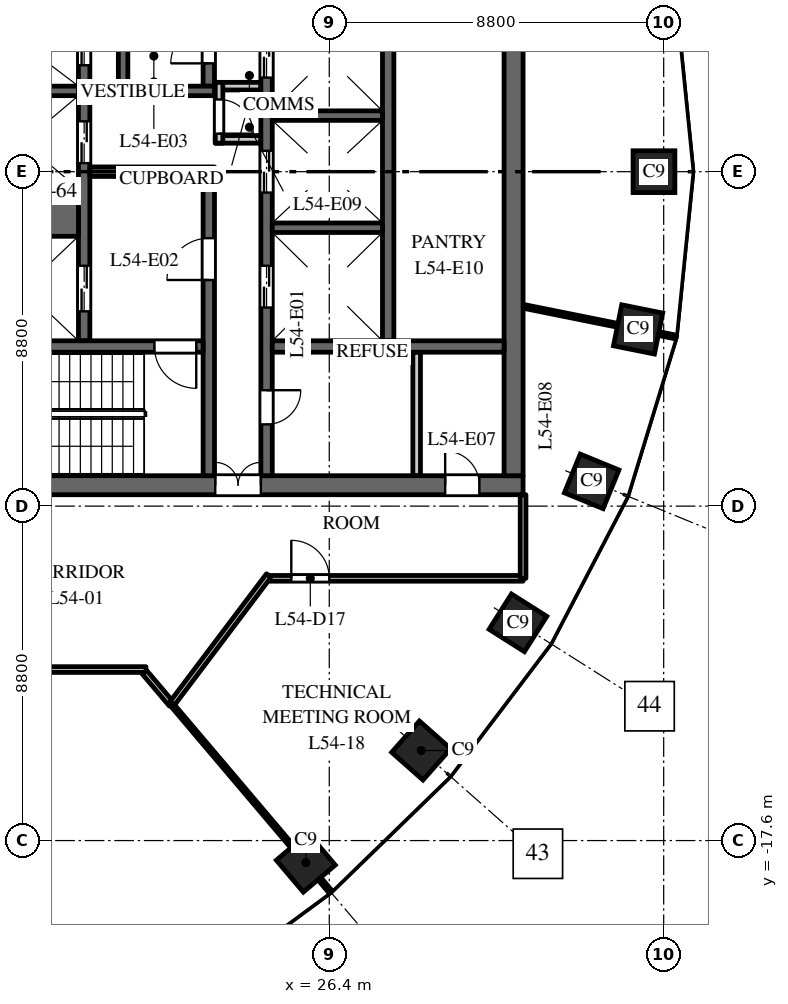
"""IFC4 building model, lengths in metres.
Left out: names, types, materials, properties, quantities, classifications, styles, units other than length and angle.
Written with IfcOpenShell. Run it as: python <this file> out.ifc"""

import sys

from ifc_helpers import new_model, si_unit, direction, frame, frame_2d, origin, origin_2d, place, context, subcontext, project, spatial, rectangle, extrude, element, fill, save


model = new_model("IFC4")
c1 = context("Model", 3, precision=1e-05, world=origin(), true_north=direction((0.0, 1.0)))
c2 = subcontext(c1, "Body", "Model", "MODEL_VIEW")
j1 = project(units=[si_unit("LENGTHUNIT", "METRE"), si_unit("PLANEANGLEUNIT", "RADIAN")], contexts=[c1])
p1 = place(None, origin())
s1 = spatial("IfcSite", under=j1, at=p1, CompositionType="ELEMENT")
p2 = place(p1, origin())
s2 = spatial("IfcBuilding", under=s1, at=p2, CompositionType="ELEMENT")
p3 = place(p2, frame((0.0, 0.0, 257.5)))
s3 = spatial("IfcBuildingStorey", under=s2, at=p3, CompositionType="ELEMENT", Elevation=257.5)
for number, where, z_axis, x_axis in (
    (1, (34.945, 0.0, 0.0), (0.0, 0.0, 1.0), (0.0, 1.0, 0.0)),
    (2, (25.783, -18.18, 0.0), (0.0, 0.0, 1.0), (0.763, 0.646, 0.0)),
    (3, (28.819, -15.23, 0.0), (0.0, 0.0, 1.0), (0.663, 0.749, 0.0)),
    (4, (31.365, -11.871, 0.0), (0.0, 0.0, 1.0), (0.535, 0.845, 0.0)),
    (5, (33.305, -8.149, 0.0), (0.0, 0.0, 1.0), (0.379, 0.925, 0.0)),
    (6, (34.527, -4.151, 0.0), (0.0, 0.0, 1.0), (0.197, 0.98, 0.0)),
):
    element("IfcColumn", number, at=place(p3, frame(where, z_axis=z_axis, x_axis=x_axis)), inside=s3, PredefinedType="COLUMN", context=c2, shape_type="SweptSolid", body=[
        extrude(rectangle(XDim=1.1, YDim=1.1, at=origin_2d()), origin(), (0.0, 0.0, 1.0), 4.0),
    ])
p4 = place(p3, frame((16.5, -8.25, 0.0), z_axis=(0.0, 0.0, 1.0), x_axis=(1.0, 0.0, 0.0)))
e7 = element("IfcWall", 7, at=p4, inside=s3, PredefinedType="SHEAR", context=c2, shape_type="SweptSolid", body=[
    extrude(rectangle(XDim=15.0, YDim=0.5, at=frame_2d((7.5, 0.0))), origin(), (0.0, 0.0, 1.0), 3.7),
])
p5 = place(p4, frame((6.9, 0.0, 0.0)))
e8 = element("IfcOpeningElement", 8, at=p5, cuts=e7, PredefinedType="OPENING", context=c2, shape_type="SweptSolid", body=[
    extrude(rectangle(XDim=1.2, YDim=2.1, at=frame_2d((0.6, 1.05))), frame((0.0, 0.26, 0.0), z_axis=(0.0, -1.0, 0.0), x_axis=(1.0, 0.0, 0.0)), (0.0, 0.0, 1.0), 0.52),
])
p6 = place(p4, frame((12.95, 0.0, 0.0)))
e9 = element("IfcOpeningElement", 9, at=p6, cuts=e7, PredefinedType="OPENING", context=c2, shape_type="SweptSolid", body=[
    extrude(rectangle(XDim=0.9, YDim=2.1, at=frame_2d((0.45, 1.05))), frame((0.0, 0.26, 0.0), z_axis=(0.0, -1.0, 0.0), x_axis=(1.0, 0.0, 0.0)), (0.0, 0.0, 1.0), 0.52),
])
p7 = place(p3, frame((27.95, -4.45, 0.0), z_axis=(0.0, 0.0, 1.0), x_axis=(0.0, 1.0, 0.0)))
e10 = element("IfcWall", 10, at=p7, inside=s3, PredefinedType="SHEAR", context=c2, shape_type="SweptSolid", body=[
    extrude(rectangle(XDim=8.9, YDim=0.3, at=frame_2d((4.45, 0.0))), origin(), (0.0, 0.0, 1.0), 3.7),
])
p8 = place(p3, frame((19.95, -4.45, 0.0), z_axis=(0.0, 0.0, 1.0), x_axis=(0.0, 1.0, 0.0)))
e11 = element("IfcWall", 11, at=p8, inside=s3, PredefinedType="SHEAR", context=c2, shape_type="SweptSolid", body=[
    extrude(rectangle(XDim=8.9, YDim=0.3, at=frame_2d((4.45, 0.0))), origin(), (0.0, 0.0, 1.0), 3.7),
])
p9 = place(p8, frame((0.775, 0.0, 0.0)))
e12 = element("IfcOpeningElement", 12, at=p9, cuts=e11, PredefinedType="OPENING", context=c2, shape_type="SweptSolid", body=[
    extrude(rectangle(XDim=1.2, YDim=2.1, at=frame_2d((0.6, 1.05))), frame((0.0, 0.16, 0.0), z_axis=(0.0, -1.0, 0.0), x_axis=(1.0, 0.0, 0.0)), (0.0, 0.0, 1.0), 0.32),
])
p10 = place(p8, frame((4.675, 0.0, 0.0)))
e13 = element("IfcOpeningElement", 13, at=p10, cuts=e11, PredefinedType="OPENING", context=c2, shape_type="SweptSolid", body=[
    extrude(rectangle(XDim=1.1, YDim=2.1, at=frame_2d((0.55, 1.05))), frame((0.0, 0.16, 0.0), z_axis=(0.0, -1.0, 0.0), x_axis=(1.0, 0.0, 0.0)), (0.0, 0.0, 1.0), 0.32),
])
p11 = place(p8, frame((7.25, 0.0, 0.0)))
e14 = element("IfcOpeningElement", 14, at=p11, cuts=e11, PredefinedType="OPENING", context=c2, shape_type="SweptSolid", body=[
    extrude(rectangle(XDim=1.1, YDim=2.1, at=frame_2d((0.55, 1.05))), frame((0.0, 0.16, 0.0), z_axis=(0.0, -1.0, 0.0), x_axis=(1.0, 0.0, 0.0)), (0.0, 0.0, 1.0), 0.32),
])
p12 = place(p3, frame((24.75, -8.0, 0.0), z_axis=(0.0, 0.0, 1.0), x_axis=(0.0, 1.0, 0.0)))
e15 = element("IfcWall", 15, at=p12, inside=s3, PredefinedType="SHEAR", context=c2, shape_type="SweptSolid", body=[
    extrude(rectangle(XDim=16.0, YDim=0.3, at=frame_2d((8.0, 0.0))), origin(), (0.0, 0.0, 1.0), 3.7),
])
p13 = place(p12, frame((4.425, 0.0, 0.0)))
e16 = element("IfcOpeningElement", 16, at=p13, cuts=e15, PredefinedType="OPENING", context=c2, shape_type="SweptSolid", body=[
    extrude(rectangle(XDim=1.1, YDim=2.1, at=frame_2d((0.55, 1.05))), frame((0.0, 0.16, 0.0), z_axis=(0.0, -1.0, 0.0), x_axis=(1.0, 0.0, 0.0)), (0.0, 0.0, 1.0), 0.32),
])
p14 = place(p12, frame((7.45, 0.0, 0.0)))
e17 = element("IfcOpeningElement", 17, at=p14, cuts=e15, PredefinedType="OPENING", context=c2, shape_type="SweptSolid", body=[
    extrude(rectangle(XDim=1.1, YDim=2.1, at=frame_2d((0.55, 1.05))), frame((0.0, 0.16, 0.0), z_axis=(0.0, -1.0, 0.0), x_axis=(1.0, 0.0, 0.0)), (0.0, 0.0, 1.0), 0.32),
])
p15 = place(p12, frame((10.475, 0.0, 0.0)))
e18 = element("IfcOpeningElement", 18, at=p15, cuts=e15, PredefinedType="OPENING", context=c2, shape_type="SweptSolid", body=[
    extrude(rectangle(XDim=1.1, YDim=2.1, at=frame_2d((0.55, 1.05))), frame((0.0, 0.16, 0.0), z_axis=(0.0, -1.0, 0.0), x_axis=(1.0, 0.0, 0.0)), (0.0, 0.0, 1.0), 0.32),
])
p16 = place(p12, frame((13.125, 0.0, 0.0)))
e19 = element("IfcOpeningElement", 19, at=p16, cuts=e15, PredefinedType="OPENING", context=c2, shape_type="SweptSolid", body=[
    extrude(rectangle(XDim=0.9, YDim=2.1, at=frame_2d((0.45, 1.05))), frame((0.0, 0.16, 0.0), z_axis=(0.0, -1.0, 0.0), x_axis=(1.0, 0.0, 0.0)), (0.0, 0.0, 1.0), 0.32),
])
p17 = place(p12, frame((14.75, 0.0, 0.0)))
e20 = element("IfcOpeningElement", 20, at=p17, cuts=e15, PredefinedType="OPENING", context=c2, shape_type="SweptSolid", body=[
    extrude(rectangle(XDim=0.9, YDim=2.1, at=frame_2d((0.45, 1.05))), frame((0.0, 0.16, 0.0), z_axis=(0.0, -1.0, 0.0), x_axis=(1.0, 0.0, 0.0)), (0.0, 0.0, 1.0), 0.32),
])
p18 = place(p12, frame((1.35, 0.0, 0.0)))
e21 = element("IfcOpeningElement", 21, at=p18, cuts=e15, PredefinedType="OPENING", context=c2, shape_type="SweptSolid", body=[
    extrude(rectangle(XDim=0.9, YDim=2.1, at=frame_2d((0.45, 1.05))), frame((0.0, 0.16, 0.0), z_axis=(0.0, -1.0, 0.0), x_axis=(1.0, 0.0, 0.0)), (0.0, 0.0, 1.0), 0.32),
])
p19 = place(p3, frame((20.1, 0.0, 0.0), z_axis=(0.0, 0.0, 1.0), x_axis=(1.0, 0.0, 0.0)))
e22 = element("IfcWall", 22, at=p19, inside=s3, PredefinedType="SHEAR", context=c2, shape_type="SweptSolid", body=[
    extrude(rectangle(XDim=3.28, YDim=0.25, at=frame_2d((1.64, 0.0))), origin(), (0.0, 0.0, 1.0), 3.7),
])
for number, where, z_axis, x_axis in (
    (23, (23.4, 0.85, 0.0), (0.0, 0.0, 1.0), (1.0, 0.0, 0.0)),
    (24, (23.4, 2.25, 0.0), (0.0, 0.0, 1.0), (1.0, 0.0, 0.0)),
):
    element("IfcWall", number, at=place(p3, frame(where, z_axis=z_axis, x_axis=x_axis)), inside=s3, PredefinedType="PARTITIONING", context=c2, shape_type="SweptSolid", body=[
        extrude(rectangle(XDim=1.2, YDim=0.2, at=frame_2d((0.6, 0.0))), origin(), (0.0, 0.0, 1.0), 3.7),
    ])
p20 = place(p3, frame((23.5, 0.75, 0.0), z_axis=(0.0, 0.0, 1.0), x_axis=(0.0, 1.0, 0.0)))
e25 = element("IfcWall", 25, at=p20, inside=s3, PredefinedType="PARTITIONING", context=c2, shape_type="SweptSolid", body=[
    extrude(rectangle(XDim=1.6, YDim=0.2, at=frame_2d((0.8, 0.0))), origin(), (0.0, 0.0, 1.0), 3.7),
])
p21 = place(p20, frame((0.25, 0.0, 0.0)))
e26 = element("IfcOpeningElement", 26, at=p21, cuts=e25, PredefinedType="OPENING", context=c2, shape_type="SweptSolid", body=[
    extrude(rectangle(XDim=0.9, YDim=2.1, at=frame_2d((0.45, 1.05))), frame((0.0, 0.11, 0.0), z_axis=(0.0, -1.0, 0.0), x_axis=(1.0, 0.0, 0.0)), (0.0, 0.0, 1.0), 0.22),
])
p22 = place(p3, frame((31.25, -8.0, 0.0), z_axis=(0.0, 0.0, 1.0), x_axis=(0.0, 1.0, 0.0)))
e27 = element("IfcWall", 27, at=p22, inside=s3, PredefinedType="SHEAR", context=c2, shape_type="SweptSolid", body=[
    extrude(rectangle(XDim=16.0, YDim=0.5, at=frame_2d((8.0, 0.0))), origin(), (0.0, 0.0, 1.0), 3.7),
])
p23 = place(p3, frame((28.7, -8.0, 0.0), z_axis=(0.0, 0.0, 1.0), x_axis=(0.0, 1.0, 0.0)))
e28 = element("IfcWall", 28, at=p23, inside=s3, PredefinedType="PARTITIONING", context=c2, shape_type="SweptSolid", body=[
    extrude(rectangle(XDim=3.25, YDim=0.2, at=frame_2d((1.625, 0.0))), origin(), (0.0, 0.0, 1.0), 3.7),
])
p24 = place(p3, frame((24.9, -4.6, 0.0), z_axis=(0.0, 0.0, 1.0), x_axis=(1.0, 0.0, 0.0)))
e29 = element("IfcWall", 29, at=p24, inside=s3, PredefinedType="SHEAR", context=c2, shape_type="SweptSolid", body=[
    extrude(rectangle(XDim=6.1, YDim=0.3, at=frame_2d((3.05, 0.0))), origin(), (0.0, 0.0, 1.0), 3.7),
])
p25 = place(p3, frame((16.9, -1.075, 0.0), z_axis=(0.0, 0.0, 1.0), x_axis=(1.0, 0.0, 0.0)))
e30 = element("IfcWall", 30, at=p25, inside=s3, PredefinedType="SHEAR", context=c2, shape_type="SweptSolid", body=[
    extrude(rectangle(XDim=2.9, YDim=1.25, at=frame_2d((1.45, 0.0))), origin(), (0.0, 0.0, 1.0), 3.7),
])
for number, where, z_axis, x_axis in (
    (31, (16.9, 2.125, 0.0), (0.0, 0.0, 1.0), (1.0, 0.0, 0.0)),
    (32, (24.9, -1.475, 0.0), (0.0, 0.0, 1.0), (1.0, 0.0, 0.0)),
    (33, (24.9, 1.475, 0.0), (0.0, 0.0, 1.0), (1.0, 0.0, 0.0)),
):
    element("IfcWall", number, at=place(p3, frame(where, z_axis=z_axis, x_axis=x_axis)), inside=s3, PredefinedType="SHEAR", context=c2, shape_type="SweptSolid", body=[
        extrude(rectangle(XDim=2.9, YDim=0.25, at=frame_2d((1.45, 0.0))), origin(), (0.0, 0.0, 1.0), 3.7),
    ])
p26 = place(p3, frame((23.23, 2.25, 0.0), z_axis=(0.0, 0.0, 1.0), x_axis=(0.0, 1.0, 0.0)))
e34 = element("IfcWall", 34, at=p26, inside=s3, PredefinedType="SHEAR", context=c2, shape_type="SweptSolid", body=[
    extrude(rectangle(XDim=5.75, YDim=0.3, at=frame_2d((2.875, 0.0))), origin(), (0.0, 0.0, 1.0), 3.7),
])
p27 = place(p26, frame((0.6, 0.0, 0.0)))
e35 = element("IfcOpeningElement", 35, at=p27, cuts=e34, PredefinedType="OPENING", context=c2, shape_type="SweptSolid", body=[
    extrude(rectangle(XDim=1.0, YDim=2.1, at=frame_2d((0.5, 1.05))), frame((0.0, 0.16, 0.0), z_axis=(0.0, -1.0, 0.0), x_axis=(1.0, 0.0, 0.0)), (0.0, 0.0, 1.0), 0.32),
])
p28 = place(p3, frame((23.23, -8.0, 0.0), z_axis=(0.0, 0.0, 1.0), x_axis=(0.0, 1.0, 0.0)))
e36 = element("IfcWall", 36, at=p28, inside=s3, PredefinedType="SHEAR", context=c2, shape_type="SweptSolid", body=[
    extrude(rectangle(XDim=7.875, YDim=0.3, at=frame_2d((3.938, 0.0))), origin(), (0.0, 0.0, 1.0), 3.7),
])
p29 = place(p28, frame((5.15, 0.0, 0.0)))
e37 = element("IfcOpeningElement", 37, at=p29, cuts=e36, PredefinedType="OPENING", context=c2, shape_type="SweptSolid", body=[
    extrude(rectangle(XDim=1.1, YDim=2.1, at=frame_2d((0.55, 1.05))), frame((0.0, 0.16, 0.0), z_axis=(0.0, -1.0, 0.0), x_axis=(1.0, 0.0, 0.0)), (0.0, 0.0, 1.0), 0.32),
])
p30 = place(p3, frame((16.9, -4.6, 0.0), z_axis=(0.0, 0.0, 1.0), x_axis=(1.0, 0.0, 0.0)))
e38 = element("IfcWall", 38, at=p30, inside=s3, PredefinedType="SHEAR", context=c2, shape_type="SweptSolid", body=[
    extrude(rectangle(XDim=6.18, YDim=0.3, at=frame_2d((3.09, 0.0))), origin(), (0.0, 0.0, 1.0), 3.7),
])
p31 = place(p30, frame((4.9, 0.0, 0.0)))
e39 = element("IfcOpeningElement", 39, at=p31, cuts=e38, PredefinedType="OPENING", context=c2, shape_type="SweptSolid", body=[
    extrude(rectangle(XDim=1.1, YDim=2.1, at=frame_2d((0.55, 1.05))), frame((0.0, 0.16, 0.0), z_axis=(0.0, -1.0, 0.0), x_axis=(1.0, 0.0, 0.0)), (0.0, 0.0, 1.0), 0.32),
])
p32 = place(p3, frame((20.85, 2.125, 0.0), z_axis=(0.0, 0.0, 1.0), x_axis=(1.0, 0.0, 0.0)))
e40 = element("IfcWall", 40, at=p32, inside=s3, PredefinedType="SHEAR", context=c2, shape_type="SweptSolid", body=[
    extrude(rectangle(XDim=2.53, YDim=0.25, at=frame_2d((1.265, 0.0))), origin(), (0.0, 0.0, 1.0), 3.7),
])
p33 = place(p3, frame((20.975, 2.25, 0.0), z_axis=(0.0, 0.0, 1.0), x_axis=(0.0, 1.0, 0.0)))
e41 = element("IfcWall", 41, at=p33, inside=s3, PredefinedType="SHEAR", context=c2, shape_type="SweptSolid", body=[
    extrude(rectangle(XDim=2.2, YDim=0.25, at=frame_2d((1.1, 0.0))), origin(), (0.0, 0.0, 1.0), 3.7),
])
p34 = place(p3, frame((7.524, -13.1, 0.0), z_axis=(0.0, 0.0, 1.0), x_axis=(1.0, 0.0, 0.0)))
e42 = element("IfcWall", 42, at=p34, inside=s3, PredefinedType="PARTITIONING", context=c2, shape_type="SweptSolid", body=[
    extrude(rectangle(XDim=14.052, YDim=0.15, at=frame_2d((7.026, 0.0))), origin(), (0.0, 0.0, 1.0), 2.85),
])
p35 = place(p34, frame((0.633, 0.0, 0.0)))
e43 = element("IfcOpeningElement", 43, at=p35, cuts=e42, PredefinedType="OPENING", context=c2, shape_type="SweptSolid", body=[
    extrude(rectangle(XDim=1.0, YDim=2.1, at=frame_2d((0.5, 1.05))), frame((0.0, 0.085, 0.0), z_axis=(0.0, -1.0, 0.0), x_axis=(1.0, 0.0, 0.0)), (0.0, 0.0, 1.0), 0.17),
])
p36 = place(p3, frame((21.541, -13.175, 0.0), z_axis=(0.0, 0.0, 1.0), x_axis=(0.646460291141, -0.762947633837, 0.0)))
e44 = element("IfcWall", 44, at=p36, inside=s3, PredefinedType="PARTITIONING", context=c2, shape_type="SweptSolid", body=[
    extrude(rectangle(XDim=1.098, YDim=0.15, at=frame_2d((0.549, 0.0))), origin(), (0.0, 0.0, 1.0), 3.7),
])
p37 = place(p3, frame((22.251, -14.013, 0.0), z_axis=(0.0, 0.0, 1.0), x_axis=(0.602435944628, 0.798167233492, 0.0)))
e45 = element("IfcWall", 45, at=p37, inside=s3, PredefinedType="PARTITIONING", context=c2, shape_type="SweptSolid", body=[
    extrude(rectangle(XDim=4.245, YDim=0.15, at=frame_2d((2.122, 0.0))), origin(), (0.0, 0.0, 1.0), 2.75),
])
p38 = place(p3, frame((22.251, -14.013, 0.0), z_axis=(0.0, 0.0, 1.0), x_axis=(0.646448300096, -0.76295779392, 0.0)))
e46 = element("IfcWall", 46, at=p38, inside=s3, PredefinedType="PARTITIONING", context=c2, shape_type="SweptSolid", body=[
    extrude(rectangle(XDim=6.465, YDim=0.1, at=frame_2d((3.232, 0.0))), origin(), (0.0, 0.0, 1.0), 3.0),
])
p39 = place(p3, frame((24.845, -10.7, 0.0), z_axis=(0.0, 0.0, 1.0), x_axis=(1.0, 0.0, 0.0)))
e47 = element("IfcWall", 47, at=p39, inside=s3, PredefinedType="PARTITIONING", context=c2, shape_type="SweptSolid", body=[
    extrude(rectangle(XDim=6.655, YDim=0.15, at=frame_2d((3.328, 0.0))), origin(), (0.0, 0.0, 1.0), 3.0),
])
p40 = place(p39, frame((0.556, 0.0, 0.0)))
e48 = element("IfcOpeningElement", 48, at=p40, cuts=e47, PredefinedType="OPENING", context=c2, shape_type="SweptSolid", body=[
    extrude(rectangle(XDim=1.0, YDim=2.1, at=frame_2d((0.5, 1.05))), frame((0.0, 0.085, 0.0), z_axis=(0.0, -1.0, 0.0), x_axis=(1.0, 0.0, 0.0)), (0.0, 0.0, 1.0), 0.17),
])
p41 = place(p3, frame((31.5, -10.7, 0.0), z_axis=(0.0, 0.0, 1.0), x_axis=(0.0, 1.0, 0.0)))
e49 = element("IfcWall", 49, at=p41, inside=s3, PredefinedType="PARTITIONING", context=c2, shape_type="SweptSolid", body=[
    extrude(rectangle(XDim=2.2, YDim=0.15, at=frame_2d((1.1, 0.0))), origin(), (0.0, 0.0, 1.0), 3.0),
])
p42 = place(p3, frame((31.5, -3.542, 0.0), z_axis=(0.0, 0.0, 1.0), x_axis=(0.980357474535, -0.197228857227, 0.0)))
e50 = element("IfcWall", 50, at=p42, inside=s3, PredefinedType="PARTITIONING", context=c2, shape_type="SweptSolid", body=[
    extrude(rectangle(XDim=4.092, YDim=0.1, at=frame_2d((2.046, 0.0))), origin(), (0.0, 0.0, 1.0), 3.0),
])
p43 = place(p9, origin())
e51 = element("IfcDoor", 51, at=p43, inside=s3, OperationType="DOUBLE_DOOR_SLIDING", PredefinedType="DOOR", context=c2, shape_type="SweptSolid", body=[
    extrude(rectangle(XDim=1.2, YDim=2.1, at=frame_2d((0.6, 1.05))), frame((0.0, 0.025, 0.0), z_axis=(0.0, -1.0, 0.0), x_axis=(1.0, 0.0, 0.0)), (0.0, 0.0, 1.0), 0.05),
])
fill(e12, e51)
p44 = place(p10, origin())
e52 = element("IfcDoor", 52, at=p44, inside=s3, OperationType="DOUBLE_DOOR_SLIDING", PredefinedType="DOOR", context=c2, shape_type="SweptSolid", body=[
    extrude(rectangle(XDim=1.1, YDim=2.1, at=frame_2d((0.55, 1.05))), frame((0.0, 0.025, 0.0), z_axis=(0.0, -1.0, 0.0), x_axis=(1.0, 0.0, 0.0)), (0.0, 0.0, 1.0), 0.05),
])
fill(e13, e52)
p45 = place(p11, origin())
e53 = element("IfcDoor", 53, at=p45, inside=s3, OperationType="DOUBLE_DOOR_SLIDING", PredefinedType="DOOR", context=c2, shape_type="SweptSolid", body=[
    extrude(rectangle(XDim=1.1, YDim=2.1, at=frame_2d((0.55, 1.05))), frame((0.0, 0.025, 0.0), z_axis=(0.0, -1.0, 0.0), x_axis=(1.0, 0.0, 0.0)), (0.0, 0.0, 1.0), 0.05),
])
fill(e14, e53)
p46 = place(p13, origin())
e54 = element("IfcDoor", 54, at=p46, inside=s3, OperationType="DOUBLE_DOOR_SLIDING", PredefinedType="DOOR", context=c2, shape_type="SweptSolid", body=[
    extrude(rectangle(XDim=1.1, YDim=2.1, at=frame_2d((0.55, 1.05))), frame((0.0, 0.025, 0.0), z_axis=(0.0, -1.0, 0.0), x_axis=(1.0, 0.0, 0.0)), (0.0, 0.0, 1.0), 0.05),
])
fill(e16, e54)
p47 = place(p14, origin())
e55 = element("IfcDoor", 55, at=p47, inside=s3, OperationType="DOUBLE_DOOR_SLIDING", PredefinedType="DOOR", context=c2, shape_type="SweptSolid", body=[
    extrude(rectangle(XDim=1.1, YDim=2.1, at=frame_2d((0.55, 1.05))), frame((0.0, 0.025, 0.0), z_axis=(0.0, -1.0, 0.0), x_axis=(1.0, 0.0, 0.0)), (0.0, 0.0, 1.0), 0.05),
])
fill(e17, e55)
p48 = place(p15, origin())
e56 = element("IfcDoor", 56, at=p48, inside=s3, OperationType="DOUBLE_DOOR_SLIDING", PredefinedType="DOOR", context=c2, shape_type="SweptSolid", body=[
    extrude(rectangle(XDim=1.1, YDim=2.1, at=frame_2d((0.55, 1.05))), frame((0.0, 0.025, 0.0), z_axis=(0.0, -1.0, 0.0), x_axis=(1.0, 0.0, 0.0)), (0.0, 0.0, 1.0), 0.05),
])
fill(e18, e56)
p49 = place(p31, origin())
e57 = element("IfcDoor", 57, at=p49, inside=s3, OperationType="SINGLE_SWING_RIGHT", PredefinedType="DOOR", context=c2, shape_type="SweptSolid", body=[
    extrude(rectangle(XDim=1.1, YDim=2.1, at=frame_2d((0.55, 1.05))), frame((0.0, 0.025, 0.0), z_axis=(0.0, -1.0, 0.0), x_axis=(1.0, 0.0, 0.0)), (0.0, 0.0, 1.0), 0.05),
])
fill(e39, e57)
p50 = place(p29, origin())
e58 = element("IfcDoor", 58, at=p50, inside=s3, OperationType="SINGLE_SWING_RIGHT", PredefinedType="DOOR", context=c2, shape_type="SweptSolid", body=[
    extrude(rectangle(XDim=1.1, YDim=2.1, at=frame_2d((0.55, 1.05))), frame((0.0, 0.025, 0.0), z_axis=(0.0, -1.0, 0.0), x_axis=(1.0, 0.0, 0.0)), (0.0, 0.0, 1.0), 0.05),
])
fill(e37, e58)
p51 = place(p27, origin())
e59 = element("IfcDoor", 59, at=p51, inside=s3, OperationType="SINGLE_SWING_RIGHT", PredefinedType="DOOR", context=c2, shape_type="SweptSolid", body=[
    extrude(rectangle(XDim=1.0, YDim=2.1, at=frame_2d((0.5, 1.05))), frame((0.0, 0.025, 0.0), z_axis=(0.0, -1.0, 0.0), x_axis=(1.0, 0.0, 0.0)), (0.0, 0.0, 1.0), 0.05),
])
fill(e35, e59)
p52 = place(p5, origin())
e60 = element("IfcDoor", 60, at=p52, inside=s3, OperationType="DOUBLE_DOOR_DOUBLE_SWING", PredefinedType="DOOR", context=c2, shape_type="SweptSolid", body=[
    extrude(rectangle(XDim=1.2, YDim=2.1, at=frame_2d((0.6, 1.05))), frame((0.0, 0.025, 0.0), z_axis=(0.0, -1.0, 0.0), x_axis=(1.0, 0.0, 0.0)), (0.0, 0.0, 1.0), 0.05),
])
fill(e8, e60)
p53 = place(p18, origin())
e61 = element("IfcDoor", 61, at=p53, inside=s3, OperationType="SINGLE_SWING_RIGHT", PredefinedType="DOOR", context=c2, shape_type="SweptSolid", body=[
    extrude(rectangle(XDim=0.9, YDim=2.1, at=frame_2d((0.45, 1.05))), frame((0.0, 0.025, 0.0), z_axis=(0.0, -1.0, 0.0), x_axis=(1.0, 0.0, 0.0)), (0.0, 0.0, 1.0), 0.05),
])
fill(e21, e61)
p54 = place(p6, origin())
e62 = element("IfcDoor", 62, at=p54, inside=s3, OperationType="SINGLE_SWING_RIGHT", PredefinedType="DOOR", context=c2, shape_type="SweptSolid", body=[
    extrude(rectangle(XDim=0.9, YDim=2.1, at=frame_2d((0.45, 1.05))), frame((0.0, 0.025, 0.0), z_axis=(0.0, -1.0, 0.0), x_axis=(1.0, 0.0, 0.0)), (0.0, 0.0, 1.0), 0.05),
])
fill(e9, e62)
p55 = place(p21, origin())
e63 = element("IfcDoor", 63, at=p55, inside=s3, OperationType="SINGLE_SWING_LEFT", PredefinedType="DOOR", context=c2, shape_type="SweptSolid", body=[
    extrude(rectangle(XDim=0.9, YDim=2.1, at=frame_2d((0.45, 1.05))), frame((0.0, 0.025, 0.0), z_axis=(0.0, -1.0, 0.0), x_axis=(1.0, 0.0, 0.0)), (0.0, 0.0, 1.0), 0.05),
])
fill(e26, e63)
p56 = place(p40, origin())
e64 = element("IfcDoor", 64, at=p56, inside=s3, OperationType="SINGLE_SWING_LEFT", PredefinedType="DOOR", context=c2, shape_type="SweptSolid", body=[
    extrude(rectangle(XDim=1.0, YDim=2.1, at=frame_2d((0.5, 1.05))), frame((0.0, 0.025, 0.0), z_axis=(0.0, -1.0, 0.0), x_axis=(1.0, 0.0, 0.0)), (0.0, 0.0, 1.0), 0.05),
])
fill(e48, e64)
save(model, sys.argv[1])
